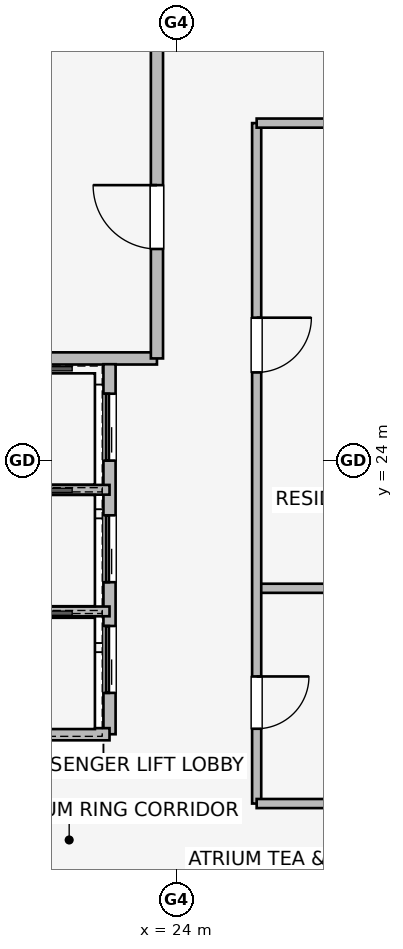
"""IFC4 building model, lengths in metres.
Left out: names, types, materials, properties, quantities, classifications, styles, units other than length and angle.
Written with IfcOpenShell. Run it as: python <this file> out.ifc"""

import sys

from ifc_helpers import new_model, si_unit, direction, frame, frame_2d, origin, place, context, subcontext, project, spatial, rectangle, extrude, element, fill, save


model = new_model("IFC4")
c1 = context("Model", 3, precision=1e-05, world=origin(), true_north=direction((0.0, 1.0)))
c2 = subcontext(c1, "Body", "Model", "MODEL_VIEW")
j1 = project(units=[si_unit("LENGTHUNIT", "METRE"), si_unit("PLANEANGLEUNIT", "RADIAN")], contexts=[c1])
p1 = place(None, origin())
s1 = spatial("IfcSite", under=j1, at=p1, CompositionType="ELEMENT")
p2 = place(p1, origin())
s2 = spatial("IfcBuilding", under=s1, at=p2, CompositionType="ELEMENT")
p3 = place(p2, frame((0.0, 0.0, 241.9)))
s3 = spatial("IfcBuildingStorey", under=s2, at=p3, CompositionType="ELEMENT", Elevation=241.9)
p4 = place(p3, frame((20.793, 25.68, 0.0), z_axis=(0.0, 0.0, 1.0), x_axis=(1.0, 0.0, 0.0)))
e1 = element("IfcWall", 1, at=p4, inside=s3, PredefinedType="PARTITIONING", context=c2, shape_type="SweptSolid", body=[
    extrude(rectangle(XDim=2.887, YDim=0.2, at=frame_2d((1.443, 0.0))), origin(), (0.0, 0.0, 1.0), 3.29),
])
p5 = place(p3, frame((23.68, 25.68, 0.0), z_axis=(0.0, 0.0, 1.0), x_axis=(0.0, 1.0, 0.0)))
e2 = element("IfcWall", 2, at=p5, inside=s3, PredefinedType="PARTITIONING", context=c2, shape_type="SweptSolid", body=[
    extrude(rectangle(XDim=5.54, YDim=0.2, at=frame_2d((2.77, 0.0))), origin(), (0.0, 0.0, 1.0), 3.29),
])
p6 = place(p5, frame((1.8, 0.0, 0.0)))
e3 = element("IfcOpeningElement", 3, at=p6, cuts=e2, PredefinedType="OPENING", context=c2, shape_type="SweptSolid", body=[
    extrude(rectangle(XDim=1.05, YDim=2.0, at=frame_2d((0.525, 1.0))), frame((0.0, 0.11, 0.0), z_axis=(0.0, -1.0, 0.0), x_axis=(1.0, 0.0, 0.0)), (0.0, 0.0, 1.0), 0.22),
])
p7 = place(p3, frame((22.9, 19.5, 0.0), z_axis=(0.0, 0.0, 1.0), x_axis=(0.0, 1.0, 0.0)))
e4 = element("IfcWall", 4, at=p7, inside=s3, PredefinedType="PARTITIONING", context=c2, shape_type="SweptSolid", body=[
    extrude(rectangle(XDim=6.085, YDim=0.2, at=frame_2d((3.042, 0.0))), origin(), (0.0, 0.0, 1.0), 3.29),
])
p8 = place(p7, frame((0.68, 0.0, 0.0)))
e5 = element("IfcOpeningElement", 5, at=p8, cuts=e4, PredefinedType="OPENING", context=c2, shape_type="SweptSolid", body=[
    extrude(rectangle(XDim=1.1, YDim=2.2, at=frame_2d((0.55, 1.1))), frame((0.0, 0.11, 0.0), z_axis=(0.0, -1.0, 0.0), x_axis=(1.0, 0.0, 0.0)), (0.0, 0.0, 1.0), 0.22),
])
p9 = place(p7, frame((2.5, 0.0, 0.0)))
e6 = element("IfcOpeningElement", 6, at=p9, cuts=e4, PredefinedType="OPENING", context=c2, shape_type="SweptSolid", body=[
    extrude(rectangle(XDim=1.1, YDim=2.2, at=frame_2d((0.55, 1.1))), frame((0.0, 0.11, 0.0), z_axis=(0.0, -1.0, 0.0), x_axis=(1.0, 0.0, 0.0)), (0.0, 0.0, 1.0), 0.22),
])
p10 = place(p7, frame((4.5, 0.0, 0.0)))
e7 = element("IfcOpeningElement", 7, at=p10, cuts=e4, PredefinedType="OPENING", context=c2, shape_type="SweptSolid", body=[
    extrude(rectangle(XDim=1.1, YDim=2.2, at=frame_2d((0.55, 1.1))), frame((0.0, 0.11, 0.0), z_axis=(0.0, -1.0, 0.0), x_axis=(1.0, 0.0, 0.0)), (0.0, 0.0, 1.0), 0.22),
])
p11 = place(p3, frame((20.49, 19.5, 0.0), z_axis=(0.0, 0.0, 1.0), x_axis=(1.0, 0.0, 0.0)))
e8 = element("IfcWall", 8, at=p11, inside=s3, PredefinedType="PARTITIONING", context=c2, shape_type="SweptSolid", body=[
    extrude(rectangle(XDim=2.41, YDim=0.2, at=frame_2d((1.205, 0.0))), origin(), (0.0, 0.0, 1.0), 2.19),
])
for number, where, z_axis, x_axis in (
    (9, (20.55, 21.52, 0.0), (0.0, 0.0, 1.0), (1.0, 0.0, 0.0)),
    (10, (20.55, 23.52, 0.0), (0.0, 0.0, 1.0), (1.0, 0.0, 0.0)),
):
    element("IfcWall", number, at=place(p3, frame(where, z_axis=z_axis, x_axis=x_axis)), inside=s3, PredefinedType="PARTITIONING", context=c2, shape_type="SweptSolid", body=[
        extrude(rectangle(XDim=2.35, YDim=0.16, at=frame_2d((1.175, 0.0))), origin(), (0.0, 0.0, 1.0), 3.29),
    ])
p12 = place(p3, frame((25.32, 21.9, 0.0), z_axis=(0.0, 0.0, 1.0), x_axis=(1.0, 0.0, 0.0)))
e11 = element("IfcWall", 11, at=p12, inside=s3, PredefinedType="PARTITIONING", context=c2, shape_type="SweptSolid", body=[
    extrude(rectangle(XDim=2.23, YDim=0.15, at=frame_2d((1.115, 0.0))), origin(), (0.0, 0.0, 1.0), 3.29),
])
p13 = place(p3, frame((25.32, 29.55, 0.0), z_axis=(0.0, 0.0, 1.0), x_axis=(0.0, -1.0, 0.0)))
e12 = element("IfcWall", 12, at=p13, inside=s3, PredefinedType="PARTITIONING", context=c2, shape_type="SweptSolid", body=[
    extrude(rectangle(XDim=11.19, YDim=0.15, at=frame_2d((5.595, 0.0))), origin(), (0.0, 0.0, 1.0), 3.29),
])
p14 = place(p13, frame((3.2, 0.0, 0.0)))
e13 = element("IfcOpeningElement", 13, at=p14, cuts=e12, PredefinedType="OPENING", context=c2, shape_type="SweptSolid", body=[
    extrude(rectangle(XDim=0.9, YDim=2.0, at=frame_2d((0.45, 1.0))), frame((0.0, 0.085, 0.0), z_axis=(0.0, -1.0, 0.0), x_axis=(1.0, 0.0, 0.0)), (0.0, 0.0, 1.0), 0.17),
])
p15 = place(p13, frame((9.1, 0.0, 0.0)))
e14 = element("IfcOpeningElement", 14, at=p15, cuts=e12, PredefinedType="OPENING", context=c2, shape_type="SweptSolid", body=[
    extrude(rectangle(XDim=0.86, YDim=2.0, at=frame_2d((0.43, 1.0))), frame((0.0, 0.085, 0.0), z_axis=(0.0, -1.0, 0.0), x_axis=(1.0, 0.0, 0.0)), (0.0, 0.0, 1.0), 0.17),
])
p16 = place(p3, frame((25.32, 18.36, 0.0), z_axis=(0.0, 0.0, 1.0), x_axis=(1.0, 0.0, 0.0)))
e15 = element("IfcWall", 15, at=p16, inside=s3, PredefinedType="PARTITIONING", context=c2, shape_type="SweptSolid", body=[
    extrude(rectangle(XDim=2.23, YDim=0.15, at=frame_2d((1.115, 0.0))), origin(), (0.0, 0.0, 1.0), 3.29),
])
p17 = place(p3, frame((27.55, 29.55, 0.0), z_axis=(0.0, 0.0, 1.0), x_axis=(-1.0, 0.0, 0.0)))
e16 = element("IfcWall", 16, at=p17, inside=s3, PredefinedType="PARTITIONING", context=c2, shape_type="SweptSolid", body=[
    extrude(rectangle(XDim=2.23, YDim=0.15, at=frame_2d((1.115, 0.0))), origin(), (0.0, 0.0, 1.0), 2.19),
])
p18 = place(p6, origin())
e17 = element("IfcDoor", 17, at=p18, inside=s3, OperationType="SINGLE_SWING_RIGHT", PredefinedType="DOOR", context=c2, shape_type="SweptSolid", body=[
    extrude(rectangle(XDim=1.05, YDim=2.0, at=frame_2d((0.525, 1.0))), frame((0.0, 0.025, 0.0), z_axis=(0.0, -1.0, 0.0), x_axis=(1.0, 0.0, 0.0)), (0.0, 0.0, 1.0), 0.05),
])
fill(e3, e17)
p19 = place(p8, origin())
e18 = element("IfcDoor", 18, at=p19, inside=s3, OperationType="SLIDING_TO_LEFT", PredefinedType="DOOR", context=c2, shape_type="SweptSolid", body=[
    extrude(rectangle(XDim=1.1, YDim=2.2, at=frame_2d((0.55, 1.1))), frame((0.0, 0.025, 0.0), z_axis=(0.0, -1.0, 0.0), x_axis=(1.0, 0.0, 0.0)), (0.0, 0.0, 1.0), 0.05),
])
fill(e5, e18)
p20 = place(p9, origin())
e19 = element("IfcDoor", 19, at=p20, inside=s3, OperationType="SLIDING_TO_LEFT", PredefinedType="DOOR", context=c2, shape_type="SweptSolid", body=[
    extrude(rectangle(XDim=1.1, YDim=2.2, at=frame_2d((0.55, 1.1))), frame((0.0, 0.025, 0.0), z_axis=(0.0, -1.0, 0.0), x_axis=(1.0, 0.0, 0.0)), (0.0, 0.0, 1.0), 0.05),
])
fill(e6, e19)
p21 = place(p10, origin())
e20 = element("IfcDoor", 20, at=p21, inside=s3, OperationType="SLIDING_TO_LEFT", PredefinedType="DOOR", context=c2, shape_type="SweptSolid", body=[
    extrude(rectangle(XDim=1.1, YDim=2.2, at=frame_2d((0.55, 1.1))), frame((0.0, 0.025, 0.0), z_axis=(0.0, -1.0, 0.0), x_axis=(1.0, 0.0, 0.0)), (0.0, 0.0, 1.0), 0.05),
])
fill(e7, e20)
p22 = place(p14, origin())
e21 = element("IfcDoor", 21, at=p22, inside=s3, OperationType="SINGLE_SWING_LEFT", PredefinedType="DOOR", context=c2, shape_type="SweptSolid", body=[
    extrude(rectangle(XDim=0.9, YDim=2.0, at=frame_2d((0.45, 1.0))), frame((0.0, 0.025, 0.0), z_axis=(0.0, -1.0, 0.0), x_axis=(1.0, 0.0, 0.0)), (0.0, 0.0, 1.0), 0.05),
])
fill(e13, e21)
p23 = place(p15, origin())
e22 = element("IfcDoor", 22, at=p23, inside=s3, OperationType="SINGLE_SWING_LEFT", PredefinedType="DOOR", context=c2, shape_type="SweptSolid", body=[
    extrude(rectangle(XDim=0.86, YDim=2.0, at=frame_2d((0.43, 1.0))), frame((0.0, 0.025, 0.0), z_axis=(0.0, -1.0, 0.0), x_axis=(1.0, 0.0, 0.0)), (0.0, 0.0, 1.0), 0.05),
])
fill(e14, e22)
save(model, sys.argv[1])
